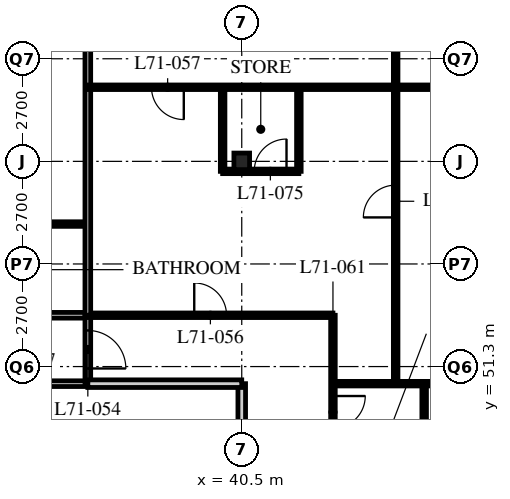
"""IFC4 building model, lengths in metres.
Left out: names, types, materials, properties, quantities, classifications, styles, units other than length and angle.
Written with IfcOpenShell. Run it as: python <this file> out.ifc"""

import sys

from ifc_helpers import new_model, si_unit, direction, frame, frame_2d, origin, origin_2d, place, context, subcontext, project, spatial, rectangle, i_section, extrude, element, fill, save


model = new_model("IFC4")
c1 = context("Model", 3, precision=1e-05, world=origin(), true_north=direction((0.0, 1.0)))
c2 = subcontext(c1, "Body", "Model", "MODEL_VIEW")
j1 = project(units=[si_unit("LENGTHUNIT", "METRE"), si_unit("PLANEANGLEUNIT", "RADIAN")], contexts=[c1])
p1 = place(None, origin())
s1 = spatial("IfcSite", under=j1, at=p1, CompositionType="ELEMENT")
p2 = place(p1, origin())
s2 = spatial("IfcBuilding", under=s1, at=p2, CompositionType="ELEMENT")
p3 = place(p2, frame((0.0, 0.0, 277.5)))
s3 = spatial("IfcBuildingStorey", under=s2, at=p3, CompositionType="ELEMENT", Elevation=277.5)
p4 = place(p3, frame((40.5, 56.7, 0.0), z_axis=(0.0, 0.0, 1.0), x_axis=(1.0, 0.0, 0.0)))
e1 = element("IfcColumn", 1, at=p4, inside=s3, PredefinedType="COLUMN", context=c2, shape_type="SweptSolid", body=[
    extrude(i_section(OverallWidth=0.412, OverallDepth=0.437, WebThickness=0.036, FlangeThickness=0.058, FilletRadius=0.015, at=origin_2d()), origin(), (0.0, 0.0, 1.0), 3.9),
])
p5 = place(p3, frame((12.15, 52.65, 0.0), z_axis=(0.0, 0.0, 1.0), x_axis=(1.0, 0.0, 0.0)))
e2 = element("IfcWall", 2, at=p5, inside=s3, PredefinedType="PARTITIONING", context=c2, shape_type="SweptSolid", body=[
    extrude(rectangle(XDim=24.3, YDim=0.15, at=frame_2d((12.15, 0.0))), origin(), (0.0, 0.0, 1.0), 3.69),
])
p6 = place(p5, frame((6.4, 0.0, 0.0)))
e3 = element("IfcOpeningElement", 3, at=p6, cuts=e2, PredefinedType="OPENING", context=c2, shape_type="SweptSolid", body=[
    extrude(rectangle(XDim=1.0, YDim=2.1, at=frame_2d((0.5, 1.05))), frame((0.0, 0.085, 0.0), z_axis=(0.0, -1.0, 0.0), x_axis=(1.0, 0.0, 0.0)), (0.0, 0.0, 1.0), 0.17),
])
p7 = place(p5, frame((8.5, 0.0, 0.0)))
e4 = element("IfcOpeningElement", 4, at=p7, cuts=e2, PredefinedType="OPENING", context=c2, shape_type="SweptSolid", body=[
    extrude(rectangle(XDim=1.0, YDim=2.1, at=frame_2d((0.5, 1.05))), frame((0.0, 0.085, 0.0), z_axis=(0.0, -1.0, 0.0), x_axis=(1.0, 0.0, 0.0)), (0.0, 0.0, 1.0), 0.17),
])
p8 = place(p5, frame((16.6, 0.0, 0.0)))
e5 = element("IfcOpeningElement", 5, at=p8, cuts=e2, PredefinedType="OPENING", context=c2, shape_type="SweptSolid", body=[
    extrude(rectangle(XDim=1.0, YDim=2.1, at=frame_2d((0.5, 1.05))), frame((0.0, 0.085, 0.0), z_axis=(0.0, -1.0, 0.0), x_axis=(1.0, 0.0, 0.0)), (0.0, 0.0, 1.0), 0.17),
])
p9 = place(p5, frame((1.525, 0.0, 0.0)))
e6 = element("IfcOpeningElement", 6, at=p9, cuts=e2, PredefinedType="OPENING", context=c2, shape_type="SweptSolid", body=[
    extrude(rectangle(XDim=1.0, YDim=2.1, at=frame_2d((0.5, 1.05))), frame((0.0, 0.085, 0.0), z_axis=(0.0, -1.0, 0.0), x_axis=(1.0, 0.0, 0.0)), (0.0, 0.0, 1.0), 0.17),
])
p10 = place(p3, frame((29.56, 50.85, 0.0), z_axis=(0.0, 0.0, 1.0), x_axis=(1.0, 0.0, 0.0)))
e7 = element("IfcWall", 7, at=p10, inside=s3, PredefinedType="PARTITIONING", context=c2, shape_type="SweptSolid", body=[
    extrude(rectangle(XDim=6.89, YDim=0.15, at=frame_2d((3.445, 0.0))), origin(), (0.0, 0.0, 1.0), 3.69),
])
p11 = place(p10, frame((1.49, 0.0, 0.0)))
e8 = element("IfcOpeningElement", 8, at=p11, cuts=e7, PredefinedType="OPENING", context=c2, shape_type="SweptSolid", body=[
    extrude(rectangle(XDim=1.0, YDim=2.1, at=frame_2d((0.5, 1.05))), frame((0.0, 0.085, 0.0), z_axis=(0.0, -1.0, 0.0), x_axis=(1.0, 0.0, 0.0)), (0.0, 0.0, 1.0), 0.17),
])
p12 = place(p10, frame((4.69, 0.0, 0.0)))
e9 = element("IfcOpeningElement", 9, at=p12, cuts=e7, PredefinedType="OPENING", context=c2, shape_type="SweptSolid", body=[
    extrude(rectangle(XDim=1.0, YDim=2.1, at=frame_2d((0.5, 1.05))), frame((0.0, 0.085, 0.0), z_axis=(0.0, -1.0, 0.0), x_axis=(1.0, 0.0, 0.0)), (0.0, 0.0, 1.0), 0.17),
])
p13 = place(p3, frame((36.45, 50.85, 0.0), z_axis=(0.0, 0.0, 1.0), x_axis=(0.0, 1.0, 0.0)))
e10 = element("IfcWall", 10, at=p13, inside=s3, PredefinedType="PARTITIONING", context=c2, shape_type="SweptSolid", body=[
    extrude(rectangle(XDim=1.8, YDim=0.15, at=frame_2d((0.9, 0.0))), origin(), (0.0, 0.0, 1.0), 3.69),
])
p14 = place(p13, frame((0.4, 0.0, 0.0)))
e11 = element("IfcOpeningElement", 11, at=p14, cuts=e10, PredefinedType="OPENING", context=c2, shape_type="SweptSolid", body=[
    extrude(rectangle(XDim=1.0, YDim=2.1, at=frame_2d((0.5, 1.05))), frame((0.0, 0.085, 0.0), z_axis=(0.0, -1.0, 0.0), x_axis=(1.0, 0.0, 0.0)), (0.0, 0.0, 1.0), 0.17),
])
p15 = place(p3, frame((40.5, 40.5, 0.0), z_axis=(0.0, 0.0, 1.0), x_axis=(0.0, 1.0, 0.0)))
e12 = element("IfcWall", 12, at=p15, inside=s3, PredefinedType="SOLIDWALL", context=c2, shape_type="SweptSolid", body=[
    extrude(rectangle(XDim=10.35, YDim=0.2, at=frame_2d((5.175, 0.0))), origin(), (0.0, 0.0, 1.0), 3.078),
])
p16 = place(p3, frame((20.25, 55.05, 0.0), z_axis=(0.0, 0.0, 1.0), x_axis=(1.0, 0.0, 0.0)))
e13 = element("IfcWall", 13, at=p16, inside=s3, PredefinedType="PARTITIONING", context=c2, shape_type="SweptSolid", body=[
    extrude(rectangle(XDim=16.2, YDim=0.12, at=frame_2d((8.1, 0.0))), origin(), (0.0, 0.0, 1.0), 3.69),
])
p17 = place(p16, frame((0.975, 0.0, 0.0)))
e14 = element("IfcOpeningElement", 14, at=p17, cuts=e13, PredefinedType="OPENING", context=c2, shape_type="SweptSolid", body=[
    extrude(rectangle(XDim=0.85, YDim=2.1, at=frame_2d((0.425, 1.05))), frame((0.0, 0.07, 0.0), z_axis=(0.0, -1.0, 0.0), x_axis=(1.0, 0.0, 0.0)), (0.0, 0.0, 1.0), 0.14),
])
p18 = place(p16, frame((4.375, 0.0, 0.0)))
e15 = element("IfcOpeningElement", 15, at=p18, cuts=e13, PredefinedType="OPENING", context=c2, shape_type="SweptSolid", body=[
    extrude(rectangle(XDim=0.85, YDim=2.1, at=frame_2d((0.425, 1.05))), frame((0.0, 0.07, 0.0), z_axis=(0.0, -1.0, 0.0), x_axis=(1.0, 0.0, 0.0)), (0.0, 0.0, 1.0), 0.14),
])
p19 = place(p16, frame((9.075, 0.0, 0.0)))
e16 = element("IfcOpeningElement", 16, at=p19, cuts=e13, PredefinedType="OPENING", context=c2, shape_type="SweptSolid", body=[
    extrude(rectangle(XDim=0.85, YDim=2.1, at=frame_2d((0.425, 1.05))), frame((0.0, 0.07, 0.0), z_axis=(0.0, -1.0, 0.0), x_axis=(1.0, 0.0, 0.0)), (0.0, 0.0, 1.0), 0.14),
])
p20 = place(p16, frame((12.475, 0.0, 0.0)))
e17 = element("IfcOpeningElement", 17, at=p20, cuts=e13, PredefinedType="OPENING", context=c2, shape_type="SweptSolid", body=[
    extrude(rectangle(XDim=0.85, YDim=2.1, at=frame_2d((0.425, 1.05))), frame((0.0, 0.07, 0.0), z_axis=(0.0, -1.0, 0.0), x_axis=(1.0, 0.0, 0.0)), (0.0, 0.0, 1.0), 0.14),
])
p21 = place(p3, frame((42.9, 52.65, 0.0), z_axis=(0.0, 0.0, 1.0), x_axis=(0.0, -1.0, 0.0)))
e18 = element("IfcWall", 18, at=p21, inside=s3, PredefinedType="PARTITIONING", context=c2, shape_type="SweptSolid", body=[
    extrude(rectangle(XDim=12.15, YDim=0.12, at=frame_2d((6.075, 0.0))), origin(), (0.0, 0.0, 1.0), 3.69),
])
p22 = place(p21, frame((2.125, 0.0, 0.0)))
e19 = element("IfcOpeningElement", 19, at=p22, cuts=e18, PredefinedType="OPENING", context=c2, shape_type="SweptSolid", body=[
    extrude(rectangle(XDim=0.85, YDim=2.1, at=frame_2d((0.425, 1.05))), frame((0.0, 0.07, 0.0), z_axis=(0.0, -1.0, 0.0), x_axis=(1.0, 0.0, 0.0)), (0.0, 0.0, 1.0), 0.14),
])
p23 = place(p21, frame((8.425, 0.0, 0.0)))
e20 = element("IfcOpeningElement", 20, at=p23, cuts=e18, PredefinedType="OPENING", context=c2, shape_type="SweptSolid", body=[
    extrude(rectangle(XDim=0.85, YDim=2.1, at=frame_2d((0.425, 1.05))), frame((0.0, 0.07, 0.0), z_axis=(0.0, -1.0, 0.0), x_axis=(1.0, 0.0, 0.0)), (0.0, 0.0, 1.0), 0.14),
])
p24 = place(p3, frame((36.45, 52.65, 0.0), z_axis=(0.0, 0.0, 1.0), x_axis=(1.0, 0.0, 0.0)))
e21 = element("IfcWall", 21, at=p24, inside=s3, PredefinedType="PARTITIONING", context=c2, shape_type="SweptSolid", body=[
    extrude(rectangle(XDim=6.45, YDim=0.12, at=frame_2d((3.225, 0.0))), origin(), (0.0, 0.0, 1.0), 3.69),
])
p25 = place(p24, frame((2.8, 0.0, 0.0)))
e22 = element("IfcOpeningElement", 22, at=p25, cuts=e21, PredefinedType="OPENING", context=c2, shape_type="SweptSolid", body=[
    extrude(rectangle(XDim=0.85, YDim=2.1, at=frame_2d((0.425, 1.05))), frame((0.0, 0.07, 0.0), z_axis=(0.0, -1.0, 0.0), x_axis=(1.0, 0.0, 0.0)), (0.0, 0.0, 1.0), 0.14),
])
p26 = place(p3, frame((36.45, 50.85, 0.0), z_axis=(0.0, 0.0, 1.0), x_axis=(1.0, 0.0, 0.0)))
e23 = element("IfcWall", 23, at=p26, inside=s3, PredefinedType="SOLIDWALL", context=c2, shape_type="SweptSolid", body=[
    extrude(rectangle(XDim=4.05, YDim=0.2, at=frame_2d((2.025, 0.0))), origin(), (0.0, 0.0, 1.0), 3.69),
])
p27 = place(p3, frame((42.9, 50.85, 0.0), z_axis=(0.0, 0.0, 1.0), x_axis=(1.0, 0.0, 0.0)))
e24 = element("IfcWall", 24, at=p27, inside=s3, PredefinedType="PARTITIONING", context=c2, shape_type="SweptSolid", body=[
    extrude(rectangle(XDim=13.5, YDim=0.12, at=frame_2d((6.75, 0.0))), origin(), (0.0, 0.0, 1.0), 3.69),
])
p28 = place(p3, frame((36.45, 64.5, 0.0), z_axis=(0.0, 0.0, 1.0), x_axis=(0.0, -1.0, 0.0)))
e25 = element("IfcWall", 25, at=p28, inside=s3, PredefinedType="PARTITIONING", context=c2, shape_type="SweptSolid", body=[
    extrude(rectangle(XDim=11.85, YDim=0.15, at=frame_2d((5.925, 0.0))), origin(), (0.0, 0.0, 1.0), 3.69),
])
p29 = place(p3, frame((36.45, 58.65, 0.0), z_axis=(0.0, 0.0, 1.0), x_axis=(1.0, 0.0, 0.0)))
e26 = element("IfcWall", 26, at=p29, inside=s3, PredefinedType="PARTITIONING", context=c2, shape_type="SweptSolid", body=[
    extrude(rectangle(XDim=15.9, YDim=0.12, at=frame_2d((7.95, 0.0))), origin(), (0.0, 0.0, 1.0), 3.69),
])
p30 = place(p29, frame((1.675, 0.0, 0.0)))
e27 = element("IfcOpeningElement", 27, at=p30, cuts=e26, PredefinedType="OPENING", context=c2, shape_type="SweptSolid", body=[
    extrude(rectangle(XDim=0.85, YDim=2.1, at=frame_2d((0.425, 1.05))), frame((0.0, 0.07, 0.0), z_axis=(0.0, -1.0, 0.0), x_axis=(1.0, 0.0, 0.0)), (0.0, 0.0, 1.0), 0.14),
])
p31 = place(p3, frame((44.55, 64.5, 0.0), z_axis=(0.0, 0.0, 1.0), x_axis=(0.0, -1.0, 0.0)))
e28 = element("IfcWall", 28, at=p31, inside=s3, PredefinedType="PARTITIONING", context=c2, shape_type="SweptSolid", body=[
    extrude(rectangle(XDim=13.65, YDim=0.12, at=frame_2d((6.825, 0.0))), origin(), (0.0, 0.0, 1.0), 3.69),
])
p32 = place(p31, frame((8.425, 0.0, 0.0)))
e29 = element("IfcOpeningElement", 29, at=p32, cuts=e28, PredefinedType="OPENING", context=c2, shape_type="SweptSolid", body=[
    extrude(rectangle(XDim=0.85, YDim=2.1, at=frame_2d((0.425, 1.05))), frame((0.0, 0.07, 0.0), z_axis=(0.0, -1.0, 0.0), x_axis=(1.0, 0.0, 0.0)), (0.0, 0.0, 1.0), 0.14),
])
p33 = place(p31, frame((2.5, 0.0, 0.0)))
e30 = element("IfcOpeningElement", 30, at=p33, cuts=e28, PredefinedType="OPENING", context=c2, shape_type="SweptSolid", body=[
    extrude(rectangle(XDim=0.85, YDim=2.1, at=frame_2d((0.425, 1.05))), frame((0.0, 0.07, 0.0), z_axis=(0.0, -1.0, 0.0), x_axis=(1.0, 0.0, 0.0)), (0.0, 0.0, 1.0), 0.14),
])
p34 = place(p3, frame((45.3, 50.85, 0.0), z_axis=(0.0, 0.0, 1.0), x_axis=(0.0, -1.0, 0.0)))
e31 = element("IfcWall", 31, at=p34, inside=s3, PredefinedType="PARTITIONING", context=c2, shape_type="SweptSolid", body=[
    extrude(rectangle(XDim=4.01, YDim=0.12, at=frame_2d((2.005, 0.0))), origin(), (0.0, 0.0, 1.0), 3.69),
])
p35 = place(p34, frame((2.885, 0.0, 0.0)))
e32 = element("IfcOpeningElement", 32, at=p35, cuts=e31, PredefinedType="OPENING", context=c2, shape_type="SweptSolid", body=[
    extrude(rectangle(XDim=0.85, YDim=2.1, at=frame_2d((0.425, 1.05))), frame((0.0, 0.07, 0.0), z_axis=(0.0, -1.0, 0.0), x_axis=(1.0, 0.0, 0.0)), (0.0, 0.0, 1.0), 0.14),
])
for number, where, z_axis, x_axis in (
    (33, (39.997, 58.65, 0.0), (0.0, 0.0, 1.0), (0.0, -1.0, 0.0)),
    (34, (42.003, 58.65, 0.0), (0.0, 0.0, 1.0), (0.0, -1.0, 0.0)),
):
    element("IfcWall", number, at=place(p3, frame(where, z_axis=z_axis, x_axis=x_axis)), inside=s3, PredefinedType="PARTITIONING", context=c2, shape_type="SweptSolid", body=[
        extrude(rectangle(XDim=2.213, YDim=0.12, at=frame_2d((1.106, 0.0))), origin(), (0.0, 0.0, 1.0), 3.69),
    ])
p36 = place(p3, frame((39.997, 56.437, 0.0), z_axis=(0.0, 0.0, 1.0), x_axis=(1.0, 0.0, 0.0)))
e35 = element("IfcWall", 35, at=p36, inside=s3, PredefinedType="PARTITIONING", context=c2, shape_type="SweptSolid", body=[
    extrude(rectangle(XDim=2.006, YDim=0.12, at=frame_2d((1.003, 0.0))), origin(), (0.0, 0.0, 1.0), 3.69),
])
p37 = place(p36, frame((0.831, 0.0, 0.0)))
e36 = element("IfcOpeningElement", 36, at=p37, cuts=e35, PredefinedType="OPENING", context=c2, shape_type="SweptSolid", body=[
    extrude(rectangle(XDim=0.85, YDim=2.1, at=frame_2d((0.425, 1.05))), frame((0.0, 0.07, 0.0), z_axis=(0.0, -1.0, 0.0), x_axis=(1.0, 0.0, 0.0)), (0.0, 0.0, 1.0), 0.14),
])
p38 = place(p14, origin())
e37 = element("IfcDoor", 37, at=p38, inside=s3, OperationType="SINGLE_SWING_RIGHT", PredefinedType="DOOR", context=c2, shape_type="SweptSolid", body=[
    extrude(rectangle(XDim=1.0, YDim=2.1, at=frame_2d((0.5, 1.05))), frame((0.0, 0.025, 0.0), z_axis=(0.0, -1.0, 0.0), x_axis=(1.0, 0.0, 0.0)), (0.0, 0.0, 1.0), 0.05),
])
fill(e11, e37)
p39 = place(p25, origin())
e38 = element("IfcDoor", 38, at=p39, inside=s3, OperationType="SINGLE_SWING_LEFT", PredefinedType="DOOR", context=c2, shape_type="SweptSolid", body=[
    extrude(rectangle(XDim=0.85, YDim=2.1, at=frame_2d((0.425, 1.05))), frame((0.0, 0.025, 0.0), z_axis=(0.0, -1.0, 0.0), x_axis=(1.0, 0.0, 0.0)), (0.0, 0.0, 1.0), 0.05),
])
fill(e22, e38)
p40 = place(p30, origin())
e39 = element("IfcDoor", 39, at=p40, inside=s3, OperationType="SINGLE_SWING_LEFT", PredefinedType="DOOR", context=c2, shape_type="SweptSolid", body=[
    extrude(rectangle(XDim=0.85, YDim=2.1, at=frame_2d((0.425, 1.05))), frame((0.0, 0.025, 0.0), z_axis=(0.0, -1.0, 0.0), x_axis=(1.0, 0.0, 0.0)), (0.0, 0.0, 1.0), 0.05),
])
fill(e27, e39)
p41 = place(p32, origin())
e40 = element("IfcDoor", 40, at=p41, inside=s3, OperationType="SINGLE_SWING_LEFT", PredefinedType="DOOR", context=c2, shape_type="SweptSolid", body=[
    extrude(rectangle(XDim=0.85, YDim=2.1, at=frame_2d((0.425, 1.05))), frame((0.0, 0.025, 0.0), z_axis=(0.0, -1.0, 0.0), x_axis=(1.0, 0.0, 0.0)), (0.0, 0.0, 1.0), 0.05),
])
fill(e29, e40)
p42 = place(p22, origin())
e41 = element("IfcDoor", 41, at=p42, inside=s3, OperationType="SINGLE_SWING_LEFT", PredefinedType="DOOR", context=c2, shape_type="SweptSolid", body=[
    extrude(rectangle(XDim=0.85, YDim=2.1, at=frame_2d((0.425, 1.05))), frame((0.0, 0.025, 0.0), z_axis=(0.0, -1.0, 0.0), x_axis=(1.0, 0.0, 0.0)), (0.0, 0.0, 1.0), 0.05),
])
fill(e19, e41)
p43 = place(p37, origin())
e42 = element("IfcDoor", 42, at=p43, inside=s3, OperationType="SINGLE_SWING_RIGHT", PredefinedType="DOOR", context=c2, shape_type="SweptSolid", body=[
    extrude(rectangle(XDim=0.85, YDim=2.1, at=frame_2d((0.425, 1.05))), frame((0.0, 0.025, 0.0), z_axis=(0.0, -1.0, 0.0), x_axis=(1.0, 0.0, 0.0)), (0.0, 0.0, 1.0), 0.05),
])
fill(e36, e42)
save(model, sys.argv[1])
